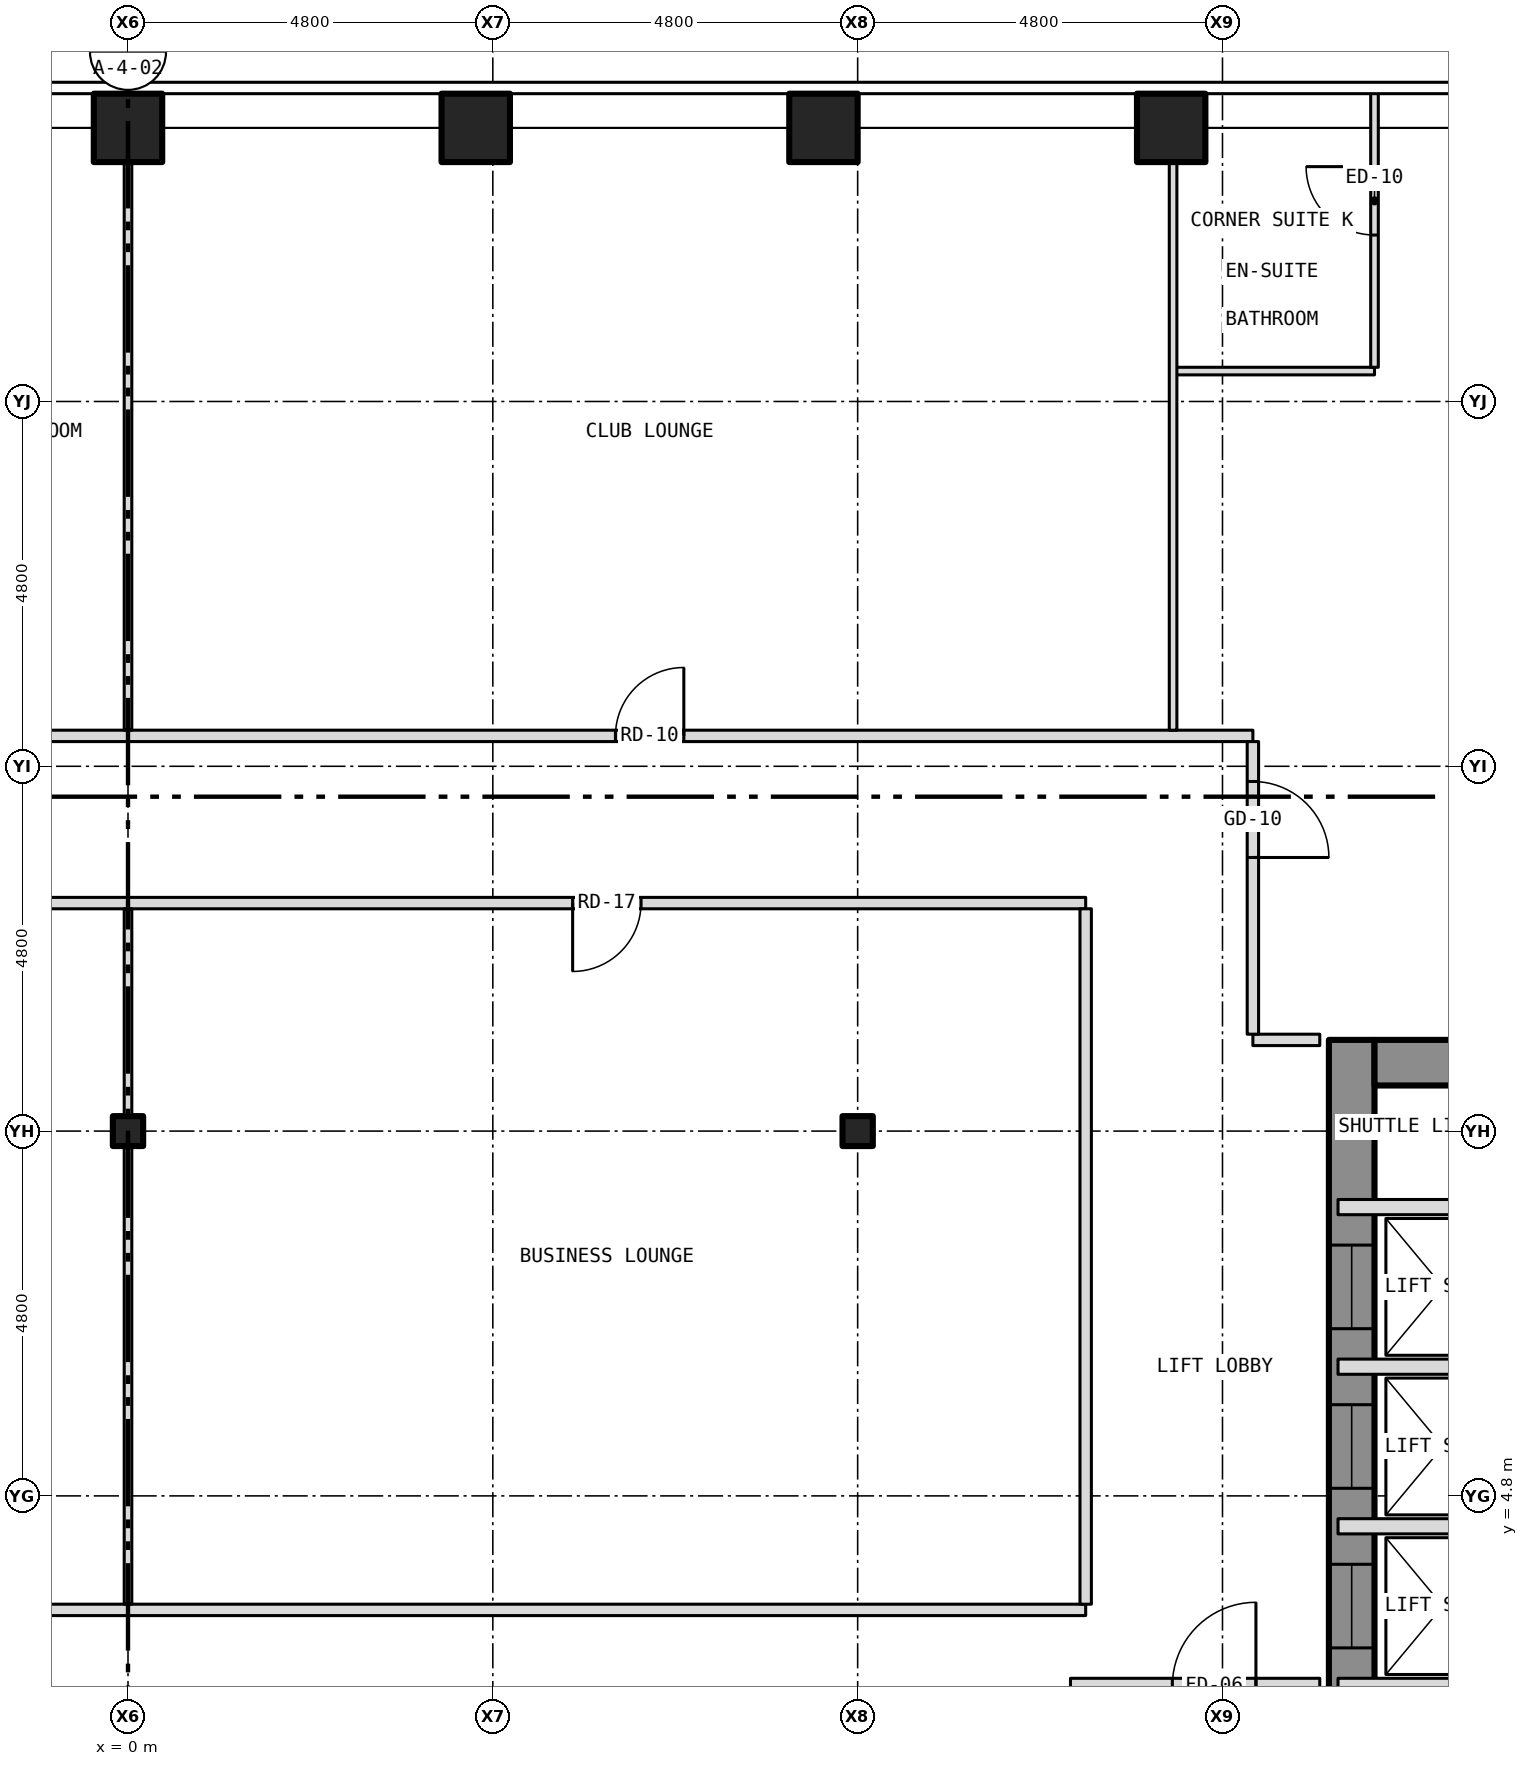
"""IFC4 building model, lengths in metres.
Left out: names, types, materials, properties, quantities, classifications, styles, units other than length and angle.
Written with IfcOpenShell. Run it as: python <this file> out.ifc"""

import sys

from ifc_helpers import new_model, si_unit, direction, frame, frame_2d, origin, origin_2d, place, context, subcontext, project, spatial, rectangle, hollow_rectangle, i_section, extrude, element, fill, save


model = new_model("IFC4")
c1 = context("Model", 3, precision=1e-05, world=origin(), true_north=direction((0.0, 1.0)))
c2 = subcontext(c1, "Body", "Model", "MODEL_VIEW")
j1 = project(units=[si_unit("LENGTHUNIT", "METRE"), si_unit("PLANEANGLEUNIT", "RADIAN")], contexts=[c1])
p1 = place(None, origin())
s1 = spatial("IfcSite", under=j1, at=p1, CompositionType="ELEMENT")
p2 = place(p1, origin())
s2 = spatial("IfcBuilding", under=s1, at=p2, CompositionType="ELEMENT")
p3 = place(p2, frame((0.0, 0.0, 99.5)))
s3 = spatial("IfcBuildingStorey", under=s2, at=p3, CompositionType="ELEMENT", Elevation=99.5)
for number, where, z_axis, x_axis in (
    (1, (0.0, 22.8, -0.15), (0.0, 0.0, 1.0), (1.0, 0.0, 0.0)),
    (2, (4.575, 22.8, -0.15), (0.0, 0.0, 1.0), (1.0, 0.0, 0.0)),
    (3, (9.15, 22.8, -0.15), (0.0, 0.0, 1.0), (1.0, 0.0, 0.0)),
    (4, (13.725, 22.8, -0.15), (0.0, 0.0, 1.0), (1.0, 0.0, 0.0)),
):
    element("IfcColumn", number, at=place(p3, frame(where, z_axis=z_axis, x_axis=x_axis)), inside=s3, PredefinedType="COLUMN", context=c2, shape_type="SweptSolid", body=[
        extrude(hollow_rectangle(XDim=0.9, YDim=0.9, WallThickness=0.05, at=origin_2d()), origin(), (0.0, 0.0, 1.0), 3.5),
    ])
for number, where, z_axis, x_axis in (
    (5, (0.0, 9.6, -0.15), (0.0, 0.0, 1.0), (1.0, 0.0, 0.0)),
    (6, (9.6, 9.6, -0.15), (0.0, 0.0, 1.0), (1.0, 0.0, 0.0)),
):
    element("IfcColumn", number, at=place(p3, frame(where, z_axis=z_axis, x_axis=x_axis)), inside=s3, PredefinedType="COLUMN", context=c2, shape_type="SweptSolid", body=[
        extrude(i_section(OverallWidth=0.399, OverallDepth=0.394, WebThickness=0.023, FlangeThickness=0.037, at=origin_2d()), origin(), (0.0, 0.0, 1.0), 3.5),
    ])
p4 = place(p3, frame((16.1, -10.8, 0.0), z_axis=(0.0, 0.0, 1.0), x_axis=(0.0, 1.0, 0.0)))
e7 = element("IfcWall", 7, at=p4, inside=s3, PredefinedType="SHEAR", context=c2, shape_type="SweptSolid", body=[
    extrude(rectangle(XDim=21.6, YDim=0.6, at=frame_2d((10.8, 0.0))), origin(), (0.0, 0.0, 1.0), 3.25),
])
p5 = place(p4, frame((9.4, 0.0, 0.0)))
e8 = element("IfcOpeningElement", 8, at=p5, cuts=e7, PredefinedType="OPENING", context=c2, shape_type="SweptSolid", body=[
    extrude(rectangle(XDim=1.1, YDim=2.1, at=frame_2d((0.55, 1.05))), frame((0.0, 0.312, 0.0), z_axis=(0.0, -1.0, 0.0), x_axis=(1.0, 0.0, 0.0)), (0.0, 0.0, 1.0), 0.624),
])
p6 = place(p4, frame((11.5, 0.0, 0.0)))
e9 = element("IfcOpeningElement", 9, at=p6, cuts=e7, PredefinedType="OPENING", context=c2, shape_type="SweptSolid", body=[
    extrude(rectangle(XDim=1.1, YDim=2.1, at=frame_2d((0.55, 1.05))), frame((0.0, 0.312, 0.0), z_axis=(0.0, -1.0, 0.0), x_axis=(1.0, 0.0, 0.0)), (0.0, 0.0, 1.0), 0.624),
])
p7 = place(p4, frame((13.6, 0.0, 0.0)))
e10 = element("IfcOpeningElement", 10, at=p7, cuts=e7, PredefinedType="OPENING", context=c2, shape_type="SweptSolid", body=[
    extrude(rectangle(XDim=1.1, YDim=2.1, at=frame_2d((0.55, 1.05))), frame((0.0, 0.312, 0.0), z_axis=(0.0, -1.0, 0.0), x_axis=(1.0, 0.0, 0.0)), (0.0, 0.0, 1.0), 0.624),
])
p8 = place(p4, frame((15.7, 0.0, 0.0)))
e11 = element("IfcOpeningElement", 11, at=p8, cuts=e7, PredefinedType="OPENING", context=c2, shape_type="SweptSolid", body=[
    extrude(rectangle(XDim=1.1, YDim=2.1, at=frame_2d((0.55, 1.05))), frame((0.0, 0.312, 0.0), z_axis=(0.0, -1.0, 0.0), x_axis=(1.0, 0.0, 0.0)), (0.0, 0.0, 1.0), 0.624),
])
p9 = place(p4, frame((17.8, 0.0, 0.0)))
e12 = element("IfcOpeningElement", 12, at=p9, cuts=e7, PredefinedType="OPENING", context=c2, shape_type="SweptSolid", body=[
    extrude(rectangle(XDim=1.1, YDim=2.1, at=frame_2d((0.55, 1.05))), frame((0.0, 0.312, 0.0), z_axis=(0.0, -1.0, 0.0), x_axis=(1.0, 0.0, 0.0)), (0.0, 0.0, 1.0), 0.624),
])
p10 = place(p4, frame((5.642, 0.0, 0.0)))
e13 = element("IfcOpeningElement", 13, at=p10, cuts=e7, PredefinedType="OPENING", context=c2, shape_type="SweptSolid", body=[
    extrude(rectangle(XDim=1.1, YDim=2.1, at=frame_2d((0.55, 1.05))), frame((0.0, 0.312, 0.0), z_axis=(0.0, -1.0, 0.0), x_axis=(1.0, 0.0, 0.0)), (0.0, 0.0, 1.0), 0.624),
])
p11 = place(p4, frame((7.5, 0.0, 0.0)))
e14 = element("IfcOpeningElement", 14, at=p11, cuts=e7, PredefinedType="OPENING", context=c2, shape_type="SweptSolid", body=[
    extrude(rectangle(XDim=1.1, YDim=2.1, at=frame_2d((0.55, 1.05))), frame((0.0, 0.312, 0.0), z_axis=(0.0, -1.0, 0.0), x_axis=(1.0, 0.0, 0.0)), (0.0, 0.0, 1.0), 0.624),
])
p12 = place(p3, frame((16.4, 10.5, 0.0), z_axis=(0.0, 0.0, 1.0), x_axis=(1.0, 0.0, 0.0)))
e15 = element("IfcWall", 15, at=p12, inside=s3, PredefinedType="SHEAR", context=c2, shape_type="SweptSolid", body=[
    extrude(rectangle(XDim=5.8, YDim=0.6, at=frame_2d((2.9, 0.0))), origin(), (0.0, 0.0, 1.0), 3.25),
])
p13 = place(p3, frame((12.4, 2.3, 0.0), z_axis=(0.0, 0.0, 1.0), x_axis=(1.0, 0.0, 0.0)))
e16 = element("IfcWall", 16, at=p13, inside=s3, PredefinedType="PARTITIONING", context=c2, shape_type="SweptSolid", body=[
    extrude(rectangle(XDim=3.28, YDim=0.2, at=frame_2d((1.64, 0.0))), origin(), (0.0, 0.0, 1.0), 3.35),
])
p14 = place(p13, frame((1.34, 0.0, 0.0)))
e17 = element("IfcOpeningElement", 17, at=p14, cuts=e16, PredefinedType="OPENING", context=c2, shape_type="SweptSolid", body=[
    extrude(rectangle(XDim=1.1, YDim=2.1, at=frame_2d((0.55, 1.05))), frame((0.0, 0.112, 0.0), z_axis=(0.0, -1.0, 0.0), x_axis=(1.0, 0.0, 0.0)), (0.0, 0.0, 1.0), 0.224),
])
p15 = place(p3, frame((15.92, 2.3, 0.0), z_axis=(0.0, 0.0, 1.0), x_axis=(1.0, 0.0, 0.0)))
e18 = element("IfcWall", 18, at=p15, inside=s3, PredefinedType="PARTITIONING", context=c2, shape_type="SweptSolid", body=[
    extrude(rectangle(XDim=2.88, YDim=0.2, at=frame_2d((1.44, 0.0))), origin(), (0.0, 0.0, 1.0), 3.25),
])
p16 = place(p3, frame((-12.6, 3.3, 0.0), z_axis=(0.0, 0.0, 1.0), x_axis=(1.0, 0.0, 0.0)))
e19 = element("IfcWall", 19, at=p16, inside=s3, PredefinedType="PARTITIONING", context=c2, shape_type="SweptSolid", body=[
    extrude(rectangle(XDim=25.2, YDim=0.15, at=frame_2d((12.6, 0.0))), origin(), (0.0, 0.0, 1.0), 3.35),
])
for number, where, z_axis, x_axis in (
    (20, (15.92, 4.4, 0.0), (0.0, 0.0, 1.0), (1.0, 0.0, 0.0)),
    (21, (15.92, 6.5, 0.0), (0.0, 0.0, 1.0), (1.0, 0.0, 0.0)),
    (22, (15.92, 8.6, 0.0), (0.0, 0.0, 1.0), (1.0, 0.0, 0.0)),
):
    element("IfcWall", number, at=place(p3, frame(where, z_axis=z_axis, x_axis=x_axis)), inside=s3, PredefinedType="PARTITIONING", context=c2, shape_type="SweptSolid", body=[
        extrude(rectangle(XDim=2.88, YDim=0.2, at=frame_2d((1.44, 0.0))), origin(), (0.0, 0.0, 1.0), 3.25),
    ])
p17 = place(p3, frame((14.8, 10.8, 0.0), z_axis=(0.0, 0.0, 1.0), x_axis=(1.0, 0.0, 0.0)))
e23 = element("IfcWall", 23, at=p17, inside=s3, PredefinedType="PARTITIONING", context=c2, shape_type="SweptSolid", body=[
    extrude(rectangle(XDim=0.88, YDim=0.15, at=frame_2d((0.44, 0.0))), origin(), (0.0, 0.0, 1.0), 3.35),
])
p18 = place(p3, frame((-12.6, 12.6, 0.0), z_axis=(0.0, 0.0, 1.0), x_axis=(1.0, 0.0, 0.0)))
e24 = element("IfcWall", 24, at=p18, inside=s3, PredefinedType="PARTITIONING", context=c2, shape_type="SweptSolid", body=[
    extrude(rectangle(XDim=25.2, YDim=0.15, at=frame_2d((12.6, 0.0))), origin(), (0.0, 0.0, 1.0), 3.35),
])
p19 = place(p18, frame((5.85, 0.0, 0.0)))
e25 = element("IfcOpeningElement", 25, at=p19, cuts=e24, PredefinedType="OPENING", context=c2, shape_type="SweptSolid", body=[
    extrude(rectangle(XDim=0.9, YDim=2.1, at=frame_2d((0.45, 1.05))), frame((0.0, 0.087, 0.0), z_axis=(0.0, -1.0, 0.0), x_axis=(1.0, 0.0, 0.0)), (0.0, 0.0, 1.0), 0.174),
])
p20 = place(p18, frame((18.45, 0.0, 0.0)))
e26 = element("IfcOpeningElement", 26, at=p20, cuts=e24, PredefinedType="OPENING", context=c2, shape_type="SweptSolid", body=[
    extrude(rectangle(XDim=0.9, YDim=2.1, at=frame_2d((0.45, 1.05))), frame((0.0, 0.087, 0.0), z_axis=(0.0, -1.0, 0.0), x_axis=(1.0, 0.0, 0.0)), (0.0, 0.0, 1.0), 0.174),
])
p21 = place(p3, frame((-14.8, 14.8, 0.0), z_axis=(0.0, 0.0, 1.0), x_axis=(1.0, 0.0, 0.0)))
e27 = element("IfcWall", 27, at=p21, inside=s3, PredefinedType="PARTITIONING", context=c2, shape_type="SweptSolid", body=[
    extrude(rectangle(XDim=29.6, YDim=0.15, at=frame_2d((14.8, 0.0))), origin(), (0.0, 0.0, 1.0), 3.35),
])
p22 = place(p21, frame((3.963, 0.0, 0.0)))
e28 = element("IfcOpeningElement", 28, at=p22, cuts=e27, PredefinedType="OPENING", context=c2, shape_type="SweptSolid", body=[
    extrude(rectangle(XDim=1.0, YDim=2.1, at=frame_2d((0.5, 1.05))), frame((0.0, 0.087, 0.0), z_axis=(0.0, -1.0, 0.0), x_axis=(1.0, 0.0, 0.0)), (0.0, 0.0, 1.0), 0.174),
])
p23 = place(p21, frame((12.241, 0.0, 0.0)))
e29 = element("IfcOpeningElement", 29, at=p23, cuts=e27, PredefinedType="OPENING", context=c2, shape_type="SweptSolid", body=[
    extrude(rectangle(XDim=1.0, YDim=2.1, at=frame_2d((0.5, 1.05))), frame((0.0, 0.087, 0.0), z_axis=(0.0, -1.0, 0.0), x_axis=(1.0, 0.0, 0.0)), (0.0, 0.0, 1.0), 0.174),
])
p24 = place(p21, frame((21.213, 0.0, 0.0)))
e30 = element("IfcOpeningElement", 30, at=p24, cuts=e27, PredefinedType="OPENING", context=c2, shape_type="SweptSolid", body=[
    extrude(rectangle(XDim=0.9, YDim=2.1, at=frame_2d((0.45, 1.05))), frame((0.0, 0.087, 0.0), z_axis=(0.0, -1.0, 0.0), x_axis=(1.0, 0.0, 0.0)), (0.0, 0.0, 1.0), 0.174),
])
p25 = place(p3, frame((13.75, 19.6, 0.0), z_axis=(0.0, 0.0, 1.0), x_axis=(1.0, 0.0, 0.0)))
e31 = element("IfcWall", 31, at=p25, inside=s3, PredefinedType="PARTITIONING", context=c2, shape_type="SweptSolid", body=[
    extrude(rectangle(XDim=2.65, YDim=0.1, at=frame_2d((1.325, 0.0))), origin(), (0.0, 0.0, 1.0), 3.35),
])
p26 = place(p3, frame((0.0, 3.375, 0.0), z_axis=(0.0, 0.0, 1.0), x_axis=(0.0, 1.0, 0.0)))
e32 = element("IfcWall", 32, at=p26, inside=s3, PredefinedType="PARTITIONING", context=c2, shape_type="SweptSolid", body=[
    extrude(rectangle(XDim=6.026, YDim=0.1, at=frame_2d((3.013, 0.0))), origin(), (0.0, 0.0, 1.0), 2.728),
])
p27 = place(p3, frame((0.0, 9.401, 0.0), z_axis=(0.0, 0.0, 1.0), x_axis=(0.0, 1.0, 0.0)))
e33 = element("IfcWall", 33, at=p27, inside=s3, PredefinedType="PARTITIONING", context=c2, shape_type="SweptSolid", body=[
    extrude(rectangle(XDim=0.398, YDim=0.1, at=frame_2d((0.199, 0.0))), origin(), (0.0, 0.0, 1.0), 3.35),
])
p28 = place(p3, frame((0.0, 9.799, 0.0), z_axis=(0.0, 0.0, 1.0), x_axis=(0.0, 1.0, 0.0)))
e34 = element("IfcWall", 34, at=p28, inside=s3, PredefinedType="PARTITIONING", context=c2, shape_type="SweptSolid", body=[
    extrude(rectangle(XDim=2.726, YDim=0.1, at=frame_2d((1.363, 0.0))), origin(), (0.0, 0.0, 1.0), 2.728),
])
p29 = place(p3, frame((0.0, 14.875, 0.0), z_axis=(0.0, 0.0, 1.0), x_axis=(0.0, 1.0, 0.0)))
e35 = element("IfcWall", 35, at=p29, inside=s3, PredefinedType="PARTITIONING", context=c2, shape_type="SweptSolid", body=[
    extrude(rectangle(XDim=7.475, YDim=0.1, at=frame_2d((3.738, 0.0))), origin(), (0.0, 0.0, 1.0), 2.728),
])
p30 = place(p3, frame((0.0, 22.35, 0.0), z_axis=(0.0, 0.0, 1.0), x_axis=(0.0, 1.0, 0.0)))
e36 = element("IfcWall", 36, at=p30, inside=s3, PredefinedType="PARTITIONING", context=c2, shape_type="SweptSolid", body=[
    extrude(rectangle(XDim=0.33, YDim=0.1, at=frame_2d((0.165, 0.0))), origin(), (0.0, 0.0, 1.0), 3.35),
])
p31 = place(p3, frame((12.6, 3.375, 0.0), z_axis=(0.0, 0.0, 1.0), x_axis=(0.0, 1.0, 0.0)))
e37 = element("IfcWall", 37, at=p31, inside=s3, PredefinedType="PARTITIONING", context=c2, shape_type="SweptSolid", body=[
    extrude(rectangle(XDim=9.15, YDim=0.15, at=frame_2d((4.575, 0.0))), origin(), (0.0, 0.0, 1.0), 3.35),
])
p32 = place(p3, frame((13.75, 14.875, 0.0), z_axis=(0.0, 0.0, 1.0), x_axis=(0.0, 1.0, 0.0)))
e38 = element("IfcWall", 38, at=p32, inside=s3, PredefinedType="PARTITIONING", context=c2, shape_type="SweptSolid", body=[
    extrude(rectangle(XDim=7.805, YDim=0.1, at=frame_2d((3.902, 0.0))), origin(), (0.0, 0.0, 1.0), 3.35),
])
p33 = place(p3, frame((14.8, 10.875, 0.0), z_axis=(0.0, 0.0, 1.0), x_axis=(0.0, 1.0, 0.0)))
e39 = element("IfcWall", 39, at=p33, inside=s3, PredefinedType="PARTITIONING", context=c2, shape_type="SweptSolid", body=[
    extrude(rectangle(XDim=3.85, YDim=0.15, at=frame_2d((1.925, 0.0))), origin(), (0.0, 0.0, 1.0), 3.35),
])
p34 = place(p33, frame((2.325, 0.0, 0.0)))
e40 = element("IfcOpeningElement", 40, at=p34, cuts=e39, PredefinedType="OPENING", context=c2, shape_type="SweptSolid", body=[
    extrude(rectangle(XDim=1.0, YDim=2.1, at=frame_2d((0.5, 1.05))), frame((0.0, 0.087, 0.0), z_axis=(0.0, -1.0, 0.0), x_axis=(1.0, 0.0, 0.0)), (0.0, 0.0, 1.0), 0.174),
])
p35 = place(p3, frame((16.4, 19.65, 0.0), z_axis=(0.0, 0.0, 1.0), x_axis=(0.0, 1.0, 0.0)))
e41 = element("IfcWall", 41, at=p35, inside=s3, PredefinedType="PARTITIONING", context=c2, shape_type="SweptSolid", body=[
    extrude(rectangle(XDim=3.63, YDim=0.1, at=frame_2d((1.815, 0.0))), origin(), (0.0, 0.0, 1.0), 3.35),
])
p36 = place(p35, frame((1.74, 0.0, 0.0)))
e42 = element("IfcOpeningElement", 42, at=p36, cuts=e41, PredefinedType="OPENING", context=c2, shape_type="SweptSolid", body=[
    extrude(rectangle(XDim=0.9, YDim=2.1, at=frame_2d((0.45, 1.05))), frame((0.0, 0.062, 0.0), z_axis=(0.0, -1.0, 0.0), x_axis=(1.0, 0.0, 0.0)), (0.0, 0.0, 1.0), 0.124),
])
p37 = place(p7, origin())
e43 = element("IfcDoor", 43, at=p37, inside=s3, OperationType="SLIDING_TO_LEFT", PredefinedType="DOOR", context=c2, shape_type="SweptSolid", body=[
    extrude(rectangle(XDim=1.1, YDim=2.1, at=frame_2d((0.55, 1.05))), frame((0.0, 0.025, 0.0), z_axis=(0.0, -1.0, 0.0), x_axis=(1.0, 0.0, 0.0)), (0.0, 0.0, 1.0), 0.05),
])
fill(e10, e43)
p38 = place(p8, origin())
e44 = element("IfcDoor", 44, at=p38, inside=s3, OperationType="SLIDING_TO_LEFT", PredefinedType="DOOR", context=c2, shape_type="SweptSolid", body=[
    extrude(rectangle(XDim=1.1, YDim=2.1, at=frame_2d((0.55, 1.05))), frame((0.0, 0.025, 0.0), z_axis=(0.0, -1.0, 0.0), x_axis=(1.0, 0.0, 0.0)), (0.0, 0.0, 1.0), 0.05),
])
fill(e11, e44)
p39 = place(p9, origin())
e45 = element("IfcDoor", 45, at=p39, inside=s3, OperationType="SLIDING_TO_LEFT", PredefinedType="DOOR", context=c2, shape_type="SweptSolid", body=[
    extrude(rectangle(XDim=1.1, YDim=2.1, at=frame_2d((0.55, 1.05))), frame((0.0, 0.025, 0.0), z_axis=(0.0, -1.0, 0.0), x_axis=(1.0, 0.0, 0.0)), (0.0, 0.0, 1.0), 0.05),
])
fill(e12, e45)
p40 = place(p14, origin())
e46 = element("IfcDoor", 46, at=p40, inside=s3, OperationType="SINGLE_SWING_RIGHT", PredefinedType="DOOR", context=c2, shape_type="SweptSolid", body=[
    extrude(rectangle(XDim=1.1, YDim=2.1, at=frame_2d((0.55, 1.05))), frame((0.0, 0.025, 0.0), z_axis=(0.0, -1.0, 0.0), x_axis=(1.0, 0.0, 0.0)), (0.0, 0.0, 1.0), 0.05),
])
fill(e17, e46)
p41 = place(p24, origin())
e47 = element("IfcDoor", 47, at=p41, inside=s3, OperationType="SINGLE_SWING_RIGHT", PredefinedType="DOOR", context=c2, shape_type="SweptSolid", body=[
    extrude(rectangle(XDim=0.9, YDim=2.1, at=frame_2d((0.45, 1.05))), frame((0.0, 0.025, 0.0), z_axis=(0.0, -1.0, 0.0), x_axis=(1.0, 0.0, 0.0)), (0.0, 0.0, 1.0), 0.05),
])
fill(e30, e47)
p42 = place(p36, origin())
e48 = element("IfcDoor", 48, at=p42, inside=s3, OperationType="SINGLE_SWING_RIGHT", PredefinedType="DOOR", context=c2, shape_type="SweptSolid", body=[
    extrude(rectangle(XDim=0.9, YDim=2.1, at=frame_2d((0.45, 1.05))), frame((0.0, 0.025, 0.0), z_axis=(0.0, -1.0, 0.0), x_axis=(1.0, 0.0, 0.0)), (0.0, 0.0, 1.0), 0.05),
])
fill(e42, e48)
p43 = place(p34, origin())
e49 = element("IfcDoor", 49, at=p43, inside=s3, OperationType="SINGLE_SWING_LEFT", PredefinedType="DOOR", context=c2, shape_type="SweptSolid", body=[
    extrude(rectangle(XDim=1.0, YDim=2.1, at=frame_2d((0.5, 1.05))), frame((0.0, 0.025, 0.0), z_axis=(0.0, -1.0, 0.0), x_axis=(1.0, 0.0, 0.0)), (0.0, 0.0, 1.0), 0.05),
])
fill(e40, e49)
p44 = place(p20, origin())
e50 = element("IfcDoor", 50, at=p44, inside=s3, OperationType="SINGLE_SWING_LEFT", PredefinedType="DOOR", context=c2, shape_type="SweptSolid", body=[
    extrude(rectangle(XDim=0.9, YDim=2.1, at=frame_2d((0.45, 1.05))), frame((0.0, 0.025, 0.0), z_axis=(0.0, -1.0, 0.0), x_axis=(1.0, 0.0, 0.0)), (0.0, 0.0, 1.0), 0.05),
])
fill(e26, e50)
save(model, sys.argv[1])
